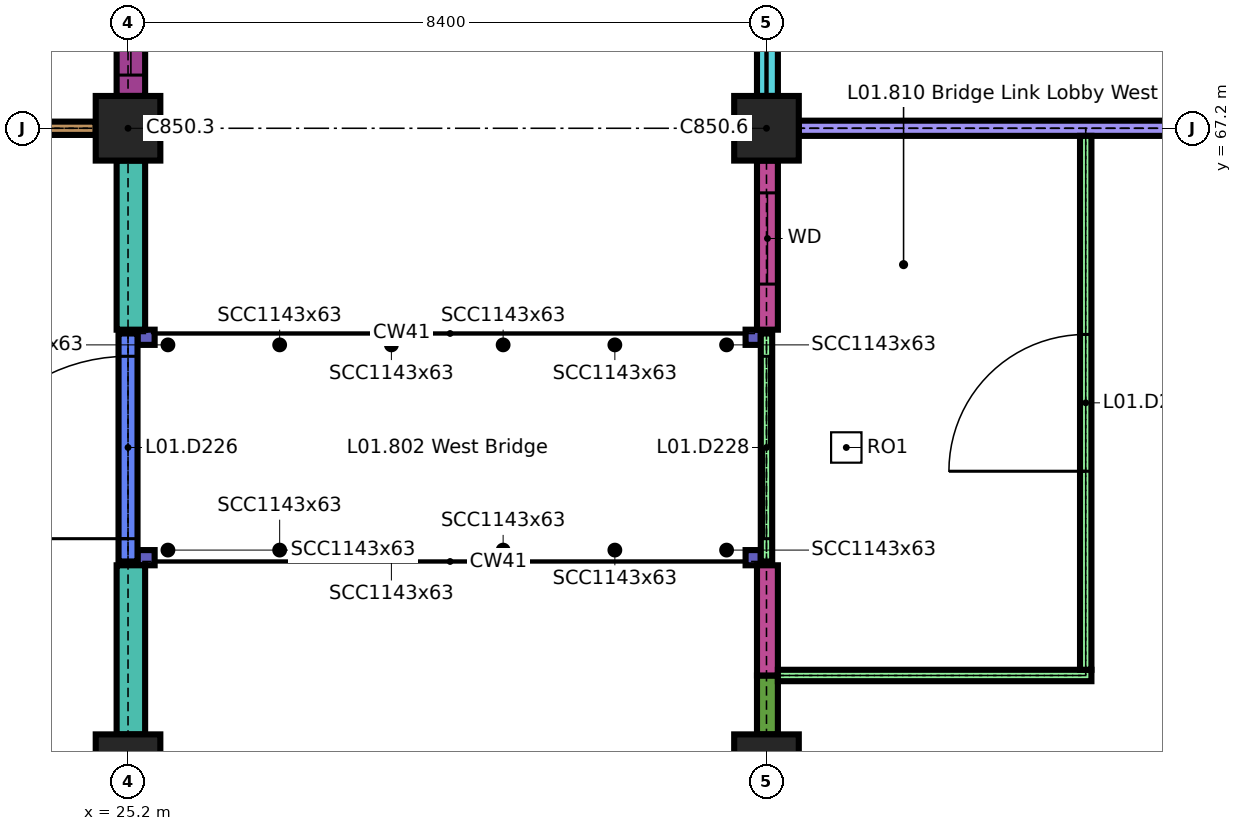
"""IFC4 building model, lengths in metres.
Left out: names, types, materials, properties, quantities, classifications, styles, units other than length and angle.
Written with IfcOpenShell. Run it as: python <this file> out.ifc"""

import sys

from ifc_helpers import new_model, si_unit, direction, frame, frame_2d, origin, origin_2d, place, context, subcontext, project, spatial, rectangle, hollow_circle, extrude, element, fill, save


model = new_model("IFC4")
c1 = context("Model", 3, precision=1e-05, world=origin(), true_north=direction((0.0, 1.0)))
c2 = subcontext(c1, "Body", "Model", "MODEL_VIEW")
j1 = project(units=[si_unit("LENGTHUNIT", "METRE"), si_unit("PLANEANGLEUNIT", "RADIAN")], contexts=[c1])
p1 = place(None, origin())
s1 = spatial("IfcSite", under=j1, at=p1, CompositionType="ELEMENT")
p2 = place(p1, origin())
s2 = spatial("IfcBuilding", under=s1, at=p2, CompositionType="ELEMENT")
p3 = place(p2, frame((0.0, 0.0, 4.5)))
s3 = spatial("IfcBuildingStorey", under=s2, at=p3, CompositionType="ELEMENT", Elevation=4.5)
p4 = place(p3, frame((25.2, 58.8, 0.0), z_axis=(0.0, 0.0, 1.0), x_axis=(1.0, 0.0, 0.0)))
e1 = element("IfcColumn", 1, at=p4, inside=s3, PredefinedType="COLUMN", context=c2, shape_type="SweptSolid", body=[
    extrude(rectangle(XDim=0.85, YDim=0.85, at=origin_2d()), origin(), (0.0, 0.0, 1.0), 3.45),
])
p5 = place(p3, frame((33.6, 58.8, 0.0), z_axis=(0.0, 0.0, 1.0), x_axis=(1.0, 0.0, 0.0)))
e2 = element("IfcColumn", 2, at=p5, inside=s3, PredefinedType="COLUMN", context=c2, shape_type="SweptSolid", body=[
    extrude(rectangle(XDim=0.85, YDim=0.85, at=origin_2d()), origin(), (0.0, 0.0, 1.0), 3.3),
])
p6 = place(p3, frame((25.2, 67.2, 0.0), z_axis=(0.0, 0.0, 1.0), x_axis=(1.0, 0.0, 0.0)))
e3 = element("IfcColumn", 3, at=p6, inside=s3, PredefinedType="COLUMN", context=c2, shape_type="SweptSolid", body=[
    extrude(rectangle(XDim=0.85, YDim=0.85, at=origin_2d()), origin(), (0.0, 0.0, 1.0), 3.45),
])
p7 = place(p3, frame((33.6, 67.2, 0.0), z_axis=(0.0, 0.0, 1.0), x_axis=(1.0, 0.0, 0.0)))
e4 = element("IfcColumn", 4, at=p7, inside=s3, PredefinedType="COLUMN", context=c2, shape_type="SweptSolid", body=[
    extrude(rectangle(XDim=0.85, YDim=0.85, at=origin_2d()), origin(), (0.0, 0.0, 1.0), 3.3),
])
for number, where, z_axis, x_axis in (
    (5, (25.725, 61.65, 0.0), (0.0, 0.0, 1.0), (1.0, 0.0, 0.0)),
    (6, (27.195, 61.65, 0.0), (0.0, 0.0, 1.0), (1.0, 0.0, 0.0)),
    (7, (28.665, 61.65, 0.0), (0.0, 0.0, 1.0), (1.0, 0.0, 0.0)),
    (8, (30.135, 61.65, 0.0), (0.0, 0.0, 1.0), (1.0, 0.0, 0.0)),
    (9, (31.605, 61.65, 0.0), (0.0, 0.0, 1.0), (1.0, 0.0, 0.0)),
    (10, (33.075, 61.65, 0.0), (0.0, 0.0, 1.0), (1.0, 0.0, 0.0)),
    (11, (25.725, 64.35, 0.0), (0.0, 0.0, 1.0), (1.0, 0.0, 0.0)),
    (12, (27.195, 64.35, 0.0), (0.0, 0.0, 1.0), (1.0, 0.0, 0.0)),
    (13, (28.665, 64.35, 0.0), (0.0, 0.0, 1.0), (1.0, 0.0, 0.0)),
    (14, (30.135, 64.35, 0.0), (0.0, 0.0, 1.0), (1.0, 0.0, 0.0)),
    (15, (31.605, 64.35, 0.0), (0.0, 0.0, 1.0), (1.0, 0.0, 0.0)),
    (16, (33.075, 64.35, 0.0), (0.0, 0.0, 1.0), (1.0, 0.0, 0.0)),
):
    element("IfcColumn", number, at=place(p3, frame(where, z_axis=z_axis, x_axis=x_axis)), inside=s3, PredefinedType="COLUMN", context=c2, shape_type="SweptSolid", body=[
        extrude(hollow_circle(Radius=0.057, WallThickness=0.006, at=origin_2d()), origin(), (0.0, 0.0, 1.0), 3.117),
    ])
p8 = place(p3, frame((25.325, 61.55, 0.0), z_axis=(0.0, 0.0, 1.0), x_axis=(1.0, 0.0, 0.0)))
e17 = element("IfcWall", 17, at=p8, inside=s3, PredefinedType="SOLIDWALL", context=c2, shape_type="SweptSolid", body=[
    extrude(rectangle(XDim=0.225, YDim=0.2, at=frame_2d((0.113, 0.0))), origin(), (0.0, 0.0, 1.0), 3.25),
])
p9 = place(p3, frame((33.325, 61.55, 0.0), z_axis=(0.0, 0.0, 1.0), x_axis=(1.0, 0.0, 0.0)))
e18 = element("IfcWall", 18, at=p9, inside=s3, PredefinedType="SOLIDWALL", context=c2, shape_type="SweptSolid", body=[
    extrude(rectangle(XDim=0.2, YDim=0.2, at=frame_2d((0.1, 0.0))), origin(), (0.0, 0.0, 1.0), 3.25),
])
p10 = place(p3, frame((25.325, 64.45, 0.0), z_axis=(0.0, 0.0, 1.0), x_axis=(1.0, 0.0, 0.0)))
e19 = element("IfcWall", 19, at=p10, inside=s3, PredefinedType="SOLIDWALL", context=c2, shape_type="SweptSolid", body=[
    extrude(rectangle(XDim=0.225, YDim=0.2, at=frame_2d((0.113, 0.0))), origin(), (0.0, 0.0, 1.0), 3.25),
])
p11 = place(p3, frame((33.325, 64.45, 0.0), z_axis=(0.0, 0.0, 1.0), x_axis=(1.0, 0.0, 0.0)))
e20 = element("IfcWall", 20, at=p11, inside=s3, PredefinedType="SOLIDWALL", context=c2, shape_type="SweptSolid", body=[
    extrude(rectangle(XDim=0.2, YDim=0.2, at=frame_2d((0.1, 0.0))), origin(), (0.0, 0.0, 1.0), 3.25),
])
for number, where, z_axis, x_axis in (
    (21, (25.238, 59.225, 0.0), (0.0, 0.0, 1.0), (0.0, 1.0, 0.0)),
    (22, (25.238, 64.55, 0.0), (0.0, 0.0, 1.0), (0.0, 1.0, 0.0)),
):
    element("IfcWall", number, at=place(p3, frame(where, z_axis=z_axis, x_axis=x_axis)), inside=s3, PredefinedType="SOLIDWALL", context=c2, shape_type="SweptSolid", body=[
        extrude(rectangle(XDim=2.225, YDim=0.375, at=frame_2d((1.112, 0.0))), origin(), (0.0, 0.0, 1.0), 3.45),
    ])
p12 = place(p3, frame((25.238, 67.625, 0.0), z_axis=(0.0, 0.0, 1.0), x_axis=(0.0, 1.0, 0.0)))
e23 = element("IfcWall", 23, at=p12, inside=s3, PredefinedType="SOLIDWALL", context=c2, shape_type="SweptSolid", body=[
    extrude(rectangle(XDim=7.975, YDim=0.375, at=frame_2d((3.988, 0.0))), origin(), (0.0, 0.0, 1.0), 3.15),
])
p13 = place(p12, frame((0.275, 0.0, 1.0)))
e24 = element("IfcOpeningElement", 24, at=p13, cuts=e23, PredefinedType="OPENING", context=c2, shape_type="SweptSolid", body=[
    extrude(rectangle(XDim=2.8, YDim=1.2, at=frame_2d((1.4, 0.6))), frame((0.0, 0.198, 0.0), z_axis=(0.0, -1.0, 0.0), x_axis=(1.0, 0.0, 0.0)), (0.0, 0.0, 1.0), 0.395),
])
p14 = place(p12, frame((4.475, 0.0, 1.0)))
e25 = element("IfcOpeningElement", 25, at=p14, cuts=e23, PredefinedType="OPENING", context=c2, shape_type="SweptSolid", body=[
    extrude(rectangle(XDim=2.8, YDim=1.2, at=frame_2d((1.4, 0.6))), frame((0.0, 0.198, 0.0), z_axis=(0.0, -1.0, 0.0), x_axis=(1.0, 0.0, 0.0)), (0.0, 0.0, 1.0), 0.395),
])
p15 = place(p3, frame((33.613, 59.225, 0.0), z_axis=(0.0, 0.0, 1.0), x_axis=(0.0, 1.0, 0.0)))
e26 = element("IfcWall", 26, at=p15, inside=s3, PredefinedType="SOLIDWALL", context=c2, shape_type="SweptSolid", body=[
    extrude(rectangle(XDim=0.775, YDim=0.275, at=frame_2d((0.387, 0.0))), origin(), (0.0, 0.0, 1.0), 3.3),
])
p16 = place(p3, frame((33.613, 60.0, 0.0), z_axis=(0.0, 0.0, 1.0), x_axis=(0.0, 1.0, 0.0)))
e27 = element("IfcWall", 27, at=p16, inside=s3, PredefinedType="SOLIDWALL", context=c2, shape_type="SweptSolid", body=[
    extrude(rectangle(XDim=1.45, YDim=0.275, at=frame_2d((0.725, 0.0))), origin(), (0.0, 0.0, 1.0), 5.0),
])
p17 = place(p3, frame((33.613, 64.55, 0.0), z_axis=(0.0, 0.0, 1.0), x_axis=(0.0, 1.0, 0.0)))
e28 = element("IfcWall", 28, at=p17, inside=s3, PredefinedType="SOLIDWALL", context=c2, shape_type="SweptSolid", body=[
    extrude(rectangle(XDim=2.225, YDim=0.275, at=frame_2d((1.112, 0.0))), origin(), (0.0, 0.0, 1.0), 5.0),
])
p18 = place(p17, frame((0.6, 0.0, 0.9)))
e29 = element("IfcOpeningElement", 29, at=p18, cuts=e28, PredefinedType="OPENING", context=c2, shape_type="SweptSolid", body=[
    extrude(rectangle(XDim=1.2, YDim=1.5, at=frame_2d((0.6, 0.75))), frame((0.0, 0.147, 0.0), z_axis=(0.0, -1.0, 0.0), x_axis=(1.0, 0.0, 0.0)), (0.0, 0.0, 1.0), 0.295),
])
p19 = place(p3, frame((33.613, 67.625, 0.0), z_axis=(0.0, 0.0, 1.0), x_axis=(0.0, 1.0, 0.0)))
e30 = element("IfcWall", 30, at=p19, inside=s3, PredefinedType="SOLIDWALL", context=c2, shape_type="SweptSolid", body=[
    extrude(rectangle(XDim=4.375, YDim=0.275, at=frame_2d((2.188, 0.0))), origin(), (0.0, 0.0, 1.0), 0.6),
])
p20 = place(p3, frame((33.75, 60.0, 0.0), z_axis=(0.0, 0.0, 1.0), x_axis=(1.0, 0.0, 0.0)))
e31 = element("IfcWall", 31, at=p20, inside=s3, PredefinedType="PARTITIONING", context=c2, shape_type="SweptSolid", body=[
    extrude(rectangle(XDim=4.125, YDim=0.15, at=frame_2d((2.062, 0.0))), origin(), (0.0, 0.0, 1.0), 3.3),
])
p21 = place(p3, frame((19.2, 67.2, 0.0), z_axis=(0.0, 0.0, 1.0), x_axis=(1.0, 0.0, 0.0)))
e32 = element("IfcWall", 32, at=p21, inside=s3, PredefinedType="PARTITIONING", context=c2, shape_type="SweptSolid", body=[
    extrude(rectangle(XDim=5.575, YDim=0.175, at=frame_2d((2.788, 0.0))), origin(), (0.0, 0.0, 1.0), 3.45),
])
p22 = place(p3, frame((34.025, 67.2, 0.0), z_axis=(0.0, 0.0, 1.0), x_axis=(1.0, 0.0, 0.0)))
e33 = element("IfcWall", 33, at=p22, inside=s3, PredefinedType="PARTITIONING", context=c2, shape_type="SweptSolid", body=[
    extrude(rectangle(XDim=7.55, YDim=0.2, at=frame_2d((3.775, 0.0))), origin(), (0.0, 0.0, 1.0), 3.3),
])
p23 = place(p22, frame((4.812, 0.0, 0.0)))
e34 = element("IfcOpeningElement", 34, at=p23, cuts=e33, PredefinedType="OPENING", context=c2, shape_type="SweptSolid", body=[
    extrude(rectangle(XDim=1.7, YDim=2.4, at=frame_2d((0.85, 1.2))), frame((0.0, 0.11, 0.0), z_axis=(0.0, -1.0, 0.0), x_axis=(1.0, 0.0, 0.0)), (0.0, 0.0, 1.0), 0.22),
])
p24 = place(p3, frame((25.2, 61.5, 0.0), z_axis=(0.0, 0.0, 1.0), x_axis=(0.0, 1.0, 0.0)))
e35 = element("IfcWall", 35, at=p24, inside=s3, PredefinedType="SOLIDWALL", context=c2, shape_type="SweptSolid", body=[
    extrude(rectangle(XDim=3.0, YDim=0.25, at=frame_2d((1.5, 0.0))), origin(), (0.0, 0.0, 1.0), 3.45),
])
p25 = place(p24, frame((0.3, 0.0, 0.0)))
e36 = element("IfcOpeningElement", 36, at=p25, cuts=e35, PredefinedType="OPENING", context=c2, shape_type="SweptSolid", body=[
    extrude(rectangle(XDim=2.4, YDim=2.4, at=frame_2d((1.2, 1.2))), frame((0.0, 0.135, 0.0), z_axis=(0.0, -1.0, 0.0), x_axis=(1.0, 0.0, 0.0)), (0.0, 0.0, 1.0), 0.27),
])
p26 = place(p3, frame((33.6, 61.5, 0.0), z_axis=(0.0, 0.0, 1.0), x_axis=(0.0, 1.0, 0.0)))
e37 = element("IfcWall", 37, at=p26, inside=s3, PredefinedType="PARTITIONING", context=c2, shape_type="SweptSolid", body=[
    extrude(rectangle(XDim=3.0, YDim=0.15, at=frame_2d((1.5, 0.0))), origin(), (0.0, 0.0, 1.0), 3.3),
])
p27 = place(p26, frame((0.3, 0.0, 0.0)))
e38 = element("IfcOpeningElement", 38, at=p27, cuts=e37, PredefinedType="OPENING", context=c2, shape_type="SweptSolid", body=[
    extrude(rectangle(XDim=2.4, YDim=2.4, at=frame_2d((1.2, 1.2))), frame((0.0, 0.085, 0.0), z_axis=(0.0, -1.0, 0.0), x_axis=(1.0, 0.0, 0.0)), (0.0, 0.0, 1.0), 0.17),
])
p28 = place(p3, frame((37.8, 60.075, 0.0), z_axis=(0.0, 0.0, 1.0), x_axis=(0.0, 1.0, 0.0)))
e39 = element("IfcWall", 39, at=p28, inside=s3, PredefinedType="PARTITIONING", context=c2, shape_type="SweptSolid", body=[
    extrude(rectangle(XDim=7.025, YDim=0.15, at=frame_2d((3.513, 0.0))), origin(), (0.0, 0.0, 1.0), 3.3),
])
p29 = place(p28, frame((2.613, 0.0, 0.0)))
e40 = element("IfcOpeningElement", 40, at=p29, cuts=e39, PredefinedType="OPENING", context=c2, shape_type="SweptSolid", body=[
    extrude(rectangle(XDim=1.8, YDim=2.4, at=frame_2d((0.9, 1.2))), frame((0.0, 0.085, 0.0), z_axis=(0.0, -1.0, 0.0), x_axis=(1.0, 0.0, 0.0)), (0.0, 0.0, 1.0), 0.17),
])
p30 = place(p13, origin())
e41 = element("IfcWindow", 41, at=p30, inside=s3, PartitioningType="DOUBLE_PANEL_VERTICAL", PredefinedType="WINDOW", context=c2, shape_type="SweptSolid", body=[
    extrude(rectangle(XDim=2.8, YDim=1.2, at=frame_2d((1.4, 0.6))), frame((0.0, 0.03, 0.0), z_axis=(0.0, -1.0, 0.0), x_axis=(1.0, 0.0, 0.0)), (0.0, 0.0, 1.0), 0.06),
])
fill(e24, e41)
p31 = place(p18, origin())
e42 = element("IfcWindow", 42, at=p31, inside=s3, PartitioningType="SINGLE_PANEL", PredefinedType="WINDOW", context=c2, shape_type="SweptSolid", body=[
    extrude(rectangle(XDim=1.2, YDim=1.5, at=frame_2d((0.6, 0.75))), frame((0.0, 0.03, 0.0), z_axis=(0.0, -1.0, 0.0), x_axis=(1.0, 0.0, 0.0)), (0.0, 0.0, 1.0), 0.06),
])
fill(e29, e42)
p32 = place(p25, origin())
e43 = element("IfcDoor", 43, at=p32, inside=s3, OperationType="SINGLE_SWING_RIGHT", PredefinedType="DOOR", context=c2, shape_type="SweptSolid", body=[
    extrude(rectangle(XDim=2.4, YDim=2.4, at=frame_2d((1.2, 1.2))), frame((0.0, 0.025, 0.0), z_axis=(0.0, -1.0, 0.0), x_axis=(1.0, 0.0, 0.0)), (0.0, 0.0, 1.0), 0.05),
])
fill(e36, e43)
p33 = place(p27, origin())
e44 = element("IfcDoor", 44, at=p33, inside=s3, OperationType="DOUBLE_DOOR_SLIDING", PredefinedType="DOOR", context=c2, shape_type="SweptSolid", body=[
    extrude(rectangle(XDim=2.4, YDim=2.4, at=frame_2d((1.2, 1.2))), frame((0.0, 0.025, 0.0), z_axis=(0.0, -1.0, 0.0), x_axis=(1.0, 0.0, 0.0)), (0.0, 0.0, 1.0), 0.05),
])
fill(e38, e44)
p34 = place(p29, origin())
e45 = element("IfcDoor", 45, at=p34, inside=s3, OperationType="SINGLE_SWING_RIGHT", PredefinedType="DOOR", context=c2, shape_type="SweptSolid", body=[
    extrude(rectangle(XDim=1.8, YDim=2.4, at=frame_2d((0.9, 1.2))), frame((0.0, 0.025, 0.0), z_axis=(0.0, -1.0, 0.0), x_axis=(1.0, 0.0, 0.0)), (0.0, 0.0, 1.0), 0.05),
])
fill(e40, e45)
save(model, sys.argv[1])
